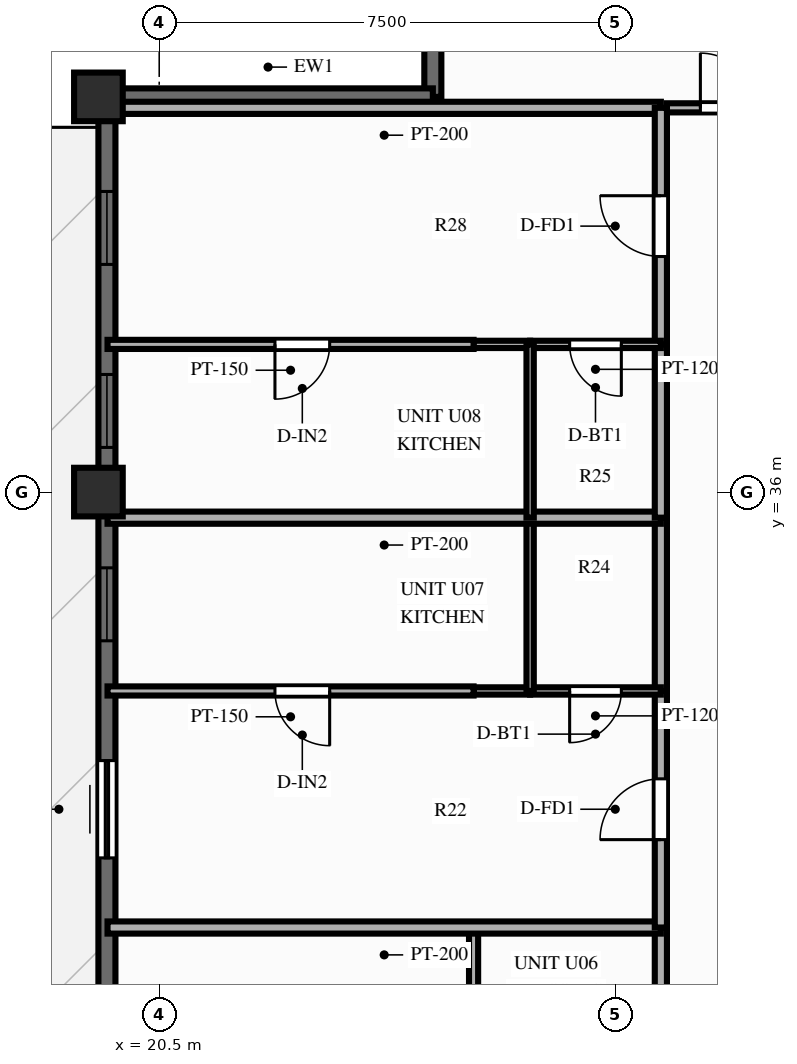
"""IFC4 building model, lengths in metres.
Left out: names, types, materials, properties, quantities, classifications, styles, units other than length and angle.
Written with IfcOpenShell. Run it as: python <this file> out.ifc"""

import sys

from ifc_helpers import new_model, si_unit, direction, frame, frame_2d, origin, origin_2d, place, context, subcontext, project, spatial, rectangle, extrude, source, transform, mapped, element, fill, save


model = new_model("IFC4")
c1 = context("Model", 3, precision=1e-05, world=origin(), true_north=direction((0.0, 1.0)))
c2 = subcontext(c1, "Body", "Model", "MODEL_VIEW")
j1 = project(units=[si_unit("LENGTHUNIT", "METRE"), si_unit("PLANEANGLEUNIT", "RADIAN")], contexts=[c1])
p1 = place(None, origin())
s1 = spatial("IfcSite", under=j1, at=p1, CompositionType="ELEMENT")
p2 = place(p1, origin())
s2 = spatial("IfcBuilding", under=s1, at=p2, CompositionType="ELEMENT")
p3 = place(p2, frame((0.0, 0.0, 199.6)))
s3 = spatial("IfcBuildingStorey", under=s2, at=p3, CompositionType="ELEMENT", Elevation=199.6)
m1 = source(origin(), c2, "Body", "SweptSolid", [
    extrude(rectangle(XDim=0.8, YDim=0.8, at=origin_2d()), origin(), (0.0, 0.0, 1.0), 3.0),
])
for number, where, z_axis, x_axis in (
    (1, (19.5, 42.5, 0.0), (0.0, 0.0, 1.0), (1.0, 0.0, 0.0)),
    (2, (19.5, 36.0, 0.0), (0.0, 0.0, 1.0), (1.0, 0.0, 0.0)),
):
    element("IfcColumn", number, at=place(p3, frame(where, z_axis=z_axis, x_axis=x_axis)), inside=s3, PredefinedType="COLUMN", context=c2, shape_type="MappedRepresentation", body=[
        mapped(m1, transform((0.0, 0.0, 0.0), scale=1.0)),
    ])
p4 = place(p3, frame((19.64, 11.5, 0.0), z_axis=(0.0, 0.0, 1.0), x_axis=(0.0, 1.0, 0.0)))
e3 = element("IfcWall", 3, at=p4, inside=s3, PredefinedType="SOLIDWALL", context=c2, shape_type="SweptSolid", body=[
    extrude(rectangle(XDim=31.0, YDim=0.28, at=frame_2d((15.5, 0.0))), origin(), (0.0, 0.0, 1.0), 2.28),
])
p5 = place(p4, frame((0.811, 0.0, 0.25)))
e4 = element("IfcOpeningElement", 4, at=p5, cuts=e3, PredefinedType="OPENING", context=c2, shape_type="SweptSolid", body=[
    extrude(rectangle(XDim=1.2, YDim=1.5, at=frame_2d((0.6, 0.75))), frame((0.0, 0.152, 0.0), z_axis=(0.0, -1.0, 0.0), x_axis=(1.0, 0.0, 0.0)), (0.0, 0.0, 1.0), 0.304),
])
p6 = place(p4, frame((3.281, 0.0, 0.25)))
e5 = element("IfcOpeningElement", 5, at=p6, cuts=e3, PredefinedType="OPENING", context=c2, shape_type="SweptSolid", body=[
    extrude(rectangle(XDim=1.2, YDim=1.5, at=frame_2d((0.6, 0.75))), frame((0.0, 0.152, 0.0), z_axis=(0.0, -1.0, 0.0), x_axis=(1.0, 0.0, 0.0)), (0.0, 0.0, 1.0), 0.304),
])
p7 = place(p4, frame((7.15, 0.0, 0.25)))
e6 = element("IfcOpeningElement", 6, at=p7, cuts=e3, PredefinedType="OPENING", context=c2, shape_type="SweptSolid", body=[
    extrude(rectangle(XDim=1.2, YDim=1.5, at=frame_2d((0.6, 0.75))), frame((0.0, 0.152, 0.0), z_axis=(0.0, -1.0, 0.0), x_axis=(1.0, 0.0, 0.0)), (0.0, 0.0, 1.0), 0.304),
])
p8 = place(p4, frame((9.36, 0.0, 0.25)))
e7 = element("IfcOpeningElement", 7, at=p8, cuts=e3, PredefinedType="OPENING", context=c2, shape_type="SweptSolid", body=[
    extrude(rectangle(XDim=1.2, YDim=1.5, at=frame_2d((0.6, 0.75))), frame((0.0, 0.152, 0.0), z_axis=(0.0, -1.0, 0.0), x_axis=(1.0, 0.0, 0.0)), (0.0, 0.0, 1.0), 0.304),
])
p9 = place(p4, frame((12.02, 0.0, 0.25)))
e8 = element("IfcOpeningElement", 8, at=p9, cuts=e3, PredefinedType="OPENING", context=c2, shape_type="SweptSolid", body=[
    extrude(rectangle(XDim=1.2, YDim=1.5, at=frame_2d((0.6, 0.75))), frame((0.0, 0.152, 0.0), z_axis=(0.0, -1.0, 0.0), x_axis=(1.0, 0.0, 0.0)), (0.0, 0.0, 1.0), 0.304),
])
p10 = place(p4, frame((15.108, 0.0, 0.25)))
e9 = element("IfcOpeningElement", 9, at=p10, cuts=e3, PredefinedType="OPENING", context=c2, shape_type="SweptSolid", body=[
    extrude(rectangle(XDim=1.2, YDim=1.5, at=frame_2d((0.6, 0.75))), frame((0.0, 0.152, 0.0), z_axis=(0.0, -1.0, 0.0), x_axis=(1.0, 0.0, 0.0)), (0.0, 0.0, 1.0), 0.304),
])
p11 = place(p4, frame((18.484, 0.0, 0.0)))
e10 = element("IfcOpeningElement", 10, at=p11, cuts=e3, PredefinedType="OPENING", context=c2, shape_type="SweptSolid", body=[
    extrude(rectangle(XDim=1.6, YDim=2.15, at=frame_2d((0.8, 1.075))), frame((0.0, 0.152, 0.0), z_axis=(0.0, -1.0, 0.0), x_axis=(1.0, 0.0, 0.0)), (0.0, 0.0, 1.0), 0.304),
])
p12 = place(p4, frame((22.054, 0.0, 0.25)))
e11 = element("IfcOpeningElement", 11, at=p12, cuts=e3, PredefinedType="OPENING", context=c2, shape_type="SweptSolid", body=[
    extrude(rectangle(XDim=1.2, YDim=1.5, at=frame_2d((0.6, 0.75))), frame((0.0, 0.152, 0.0), z_axis=(0.0, -1.0, 0.0), x_axis=(1.0, 0.0, 0.0)), (0.0, 0.0, 1.0), 0.304),
])
p13 = place(p4, frame((25.235, 0.0, 0.25)))
e12 = element("IfcOpeningElement", 12, at=p13, cuts=e3, PredefinedType="OPENING", context=c2, shape_type="SweptSolid", body=[
    extrude(rectangle(XDim=1.2, YDim=1.5, at=frame_2d((0.6, 0.75))), frame((0.0, 0.152, 0.0), z_axis=(0.0, -1.0, 0.0), x_axis=(1.0, 0.0, 0.0)), (0.0, 0.0, 1.0), 0.304),
])
p14 = place(p4, frame((28.245, 0.0, 0.25)))
e13 = element("IfcOpeningElement", 13, at=p14, cuts=e3, PredefinedType="OPENING", context=c2, shape_type="SweptSolid", body=[
    extrude(rectangle(XDim=1.2, YDim=1.5, at=frame_2d((0.6, 0.75))), frame((0.0, 0.152, 0.0), z_axis=(0.0, -1.0, 0.0), x_axis=(1.0, 0.0, 0.0)), (0.0, 0.0, 1.0), 0.304),
])
for number, where, z_axis, x_axis in (
    (14, (25.0, 42.5, 0.0), (0.0, 0.0, 1.0), (0.0, 1.0, 0.0)),
    (15, (19.58, 42.5, 0.0), (0.0, 0.0, 1.0), (1.0, 0.0, 0.0)),
):
    element("IfcWall", number, at=place(p3, frame(where, z_axis=z_axis, x_axis=x_axis)), inside=s3, PredefinedType="SOLIDWALL", context=c2, shape_type="SweptSolid", body=[
        extrude(rectangle(XDim=5.42, YDim=0.28, at=frame_2d((2.71, 0.0))), origin(), (0.0, 0.0, 1.0), 2.28),
    ])
p15 = place(p3, frame((28.85, 42.32, 0.0), z_axis=(0.0, 0.0, 1.0), x_axis=(1.0, 0.0, 0.0)))
e16 = element("IfcWall", 16, at=p15, inside=s3, PredefinedType="PARTITIONING", context=c2, shape_type="SweptSolid", body=[
    extrude(rectangle(XDim=2.33, YDim=0.15, at=frame_2d((1.165, 0.0))), origin(), (0.0, 0.0, 1.0), 2.79),
])
p16 = place(p15, frame((0.55, 0.0, 0.0)))
e17 = element("IfcOpeningElement", 17, at=p16, cuts=e16, PredefinedType="OPENING", context=c2, shape_type="SweptSolid", body=[
    extrude(rectangle(XDim=0.9, YDim=2.1, at=frame_2d((0.45, 1.05))), frame((0.0, 0.087, 0.0), z_axis=(0.0, -1.0, 0.0), x_axis=(1.0, 0.0, 0.0)), (0.0, 0.0, 1.0), 0.174),
])
p17 = place(p3, frame((28.75, 42.32, 0.0), z_axis=(0.0, 0.0, 1.0), x_axis=(-1.0, 0.0, 0.0)))
e18 = element("IfcWall", 18, at=p17, inside=s3, PredefinedType="PARTITIONING", context=c2, shape_type="SweptSolid", body=[
    extrude(rectangle(XDim=9.1, YDim=0.2, at=frame_2d((4.55, 0.0))), origin(), (0.0, 0.0, 1.0), 2.79),
])
p18 = place(p3, frame((28.75, 25.578, 0.0), z_axis=(0.0, 0.0, 1.0), x_axis=(0.0, 1.0, 0.0)))
e19 = element("IfcWall", 19, at=p18, inside=s3, PredefinedType="PARTITIONING", context=c2, shape_type="SweptSolid", body=[
    extrude(rectangle(XDim=3.26, YDim=0.2, at=frame_2d((1.63, 0.0))), origin(), (0.0, 0.0, 1.0), 2.79),
])
p19 = place(p3, frame((25.67, 25.578, 0.0), z_axis=(0.0, 0.0, 1.0), x_axis=(0.0, 1.0, 0.0)))
e20 = element("IfcWall", 20, at=p19, inside=s3, PredefinedType="PARTITIONING", context=c2, shape_type="SweptSolid", body=[
    extrude(rectangle(XDim=3.26, YDim=0.15, at=frame_2d((1.63, 0.0))), origin(), (0.0, 0.0, 1.0), 2.49),
])
p20 = place(p3, frame((28.75, 28.838, 0.0), z_axis=(0.0, 0.0, 1.0), x_axis=(-1.0, 0.0, 0.0)))
e21 = element("IfcWall", 21, at=p20, inside=s3, PredefinedType="PARTITIONING", context=c2, shape_type="SweptSolid", body=[
    extrude(rectangle(XDim=9.1, YDim=0.2, at=frame_2d((4.55, 0.0))), origin(), (0.0, 0.0, 1.0), 2.79),
])
p21 = place(p3, frame((28.75, 28.838, 0.0), z_axis=(0.0, 0.0, 1.0), x_axis=(0.0, 1.0, 0.0)))
e22 = element("IfcWall", 22, at=p21, inside=s3, PredefinedType="PARTITIONING", context=c2, shape_type="SweptSolid", body=[
    extrude(rectangle(XDim=3.891, YDim=0.2, at=frame_2d((1.945, 0.0))), origin(), (0.0, 0.0, 1.0), 2.79),
])
p22 = place(p21, frame((1.445, 0.0, 0.0)))
e23 = element("IfcOpeningElement", 23, at=p22, cuts=e22, PredefinedType="OPENING", context=c2, shape_type="SweptSolid", body=[
    extrude(rectangle(XDim=1.0, YDim=2.15, at=frame_2d((0.5, 1.075))), frame((0.0, 0.112, 0.0), z_axis=(0.0, -1.0, 0.0), x_axis=(1.0, 0.0, 0.0)), (0.0, 0.0, 1.0), 0.224),
])
p23 = place(p3, frame((28.75, 32.729, 0.0), z_axis=(0.0, 0.0, 1.0), x_axis=(0.0, 1.0, 0.0)))
e24 = element("IfcWall", 24, at=p23, inside=s3, PredefinedType="PARTITIONING", context=c2, shape_type="SweptSolid", body=[
    extrude(rectangle(XDim=2.85, YDim=0.2, at=frame_2d((1.425, 0.0))), origin(), (0.0, 0.0, 1.0), 2.79),
])
p24 = place(p3, frame((28.75, 32.729, 0.0), z_axis=(0.0, 0.0, 1.0), x_axis=(-1.0, 0.0, 0.0)))
e25 = element("IfcWall", 25, at=p24, inside=s3, PredefinedType="PARTITIONING", context=c2, shape_type="SweptSolid", body=[
    extrude(rectangle(XDim=2.15, YDim=0.12, at=frame_2d((1.075, 0.0))), origin(), (0.0, 0.0, 1.0), 2.79),
])
p25 = place(p24, frame((0.65, 0.0, 0.0)))
e26 = element("IfcOpeningElement", 26, at=p25, cuts=e25, PredefinedType="OPENING", context=c2, shape_type="SweptSolid", body=[
    extrude(rectangle(XDim=0.85, YDim=2.05, at=frame_2d((0.425, 1.025))), frame((0.0, 0.072, 0.0), z_axis=(0.0, -1.0, 0.0), x_axis=(1.0, 0.0, 0.0)), (0.0, 0.0, 1.0), 0.144),
])
p26 = place(p3, frame((26.6, 32.729, 0.0), z_axis=(0.0, 0.0, 1.0), x_axis=(-1.0, 0.0, 0.0)))
e27 = element("IfcWall", 27, at=p26, inside=s3, PredefinedType="PARTITIONING", context=c2, shape_type="SweptSolid", body=[
    extrude(rectangle(XDim=0.93, YDim=0.12, at=frame_2d((0.465, 0.0))), origin(), (0.0, 0.0, 1.0), 2.79),
])
p27 = place(p3, frame((26.6, 32.729, 0.0), z_axis=(0.0, 0.0, 1.0), x_axis=(0.0, 1.0, 0.0)))
e28 = element("IfcWall", 28, at=p27, inside=s3, PredefinedType="PARTITIONING", context=c2, shape_type="SweptSolid", body=[
    extrude(rectangle(XDim=2.85, YDim=0.12, at=frame_2d((1.425, 0.0))), origin(), (0.0, 0.0, 1.0), 2.79),
])
p28 = place(p3, frame((25.67, 32.729, 0.0), z_axis=(0.0, 0.0, 1.0), x_axis=(-1.0, 0.0, 0.0)))
e29 = element("IfcWall", 29, at=p28, inside=s3, PredefinedType="PARTITIONING", context=c2, shape_type="SweptSolid", body=[
    extrude(rectangle(XDim=6.02, YDim=0.15, at=frame_2d((3.01, 0.0))), origin(), (0.0, 0.0, 1.0), 2.79),
])
p29 = place(p28, frame((2.367, 0.0, 0.0)))
e30 = element("IfcOpeningElement", 30, at=p29, cuts=e29, PredefinedType="OPENING", context=c2, shape_type="SweptSolid", body=[
    extrude(rectangle(XDim=0.9, YDim=2.1, at=frame_2d((0.45, 1.05))), frame((0.0, 0.087, 0.0), z_axis=(0.0, -1.0, 0.0), x_axis=(1.0, 0.0, 0.0)), (0.0, 0.0, 1.0), 0.174),
])
p30 = place(p3, frame((28.75, 35.579, 0.0), z_axis=(0.0, 0.0, 1.0), x_axis=(-1.0, 0.0, 0.0)))
e31 = element("IfcWall", 31, at=p30, inside=s3, PredefinedType="PARTITIONING", context=c2, shape_type="SweptSolid", body=[
    extrude(rectangle(XDim=9.1, YDim=0.2, at=frame_2d((4.55, 0.0))), origin(), (0.0, 0.0, 1.0), 2.79),
])
p31 = place(p3, frame((28.75, 35.579, 0.0), z_axis=(0.0, 0.0, 1.0), x_axis=(0.0, 1.0, 0.0)))
e32 = element("IfcWall", 32, at=p31, inside=s3, PredefinedType="PARTITIONING", context=c2, shape_type="SweptSolid", body=[
    extrude(rectangle(XDim=2.85, YDim=0.2, at=frame_2d((1.425, 0.0))), origin(), (0.0, 0.0, 1.0), 2.79),
])
p32 = place(p3, frame((28.75, 38.429, 0.0), z_axis=(0.0, 0.0, 1.0), x_axis=(0.0, 1.0, 0.0)))
e33 = element("IfcWall", 33, at=p32, inside=s3, PredefinedType="PARTITIONING", context=c2, shape_type="SweptSolid", body=[
    extrude(rectangle(XDim=3.891, YDim=0.2, at=frame_2d((1.945, 0.0))), origin(), (0.0, 0.0, 1.0), 2.79),
])
p33 = place(p32, frame((1.445, 0.0, 0.0)))
e34 = element("IfcOpeningElement", 34, at=p33, cuts=e33, PredefinedType="OPENING", context=c2, shape_type="SweptSolid", body=[
    extrude(rectangle(XDim=1.0, YDim=2.15, at=frame_2d((0.5, 1.075))), frame((0.0, 0.112, 0.0), z_axis=(0.0, -1.0, 0.0), x_axis=(1.0, 0.0, 0.0)), (0.0, 0.0, 1.0), 0.224),
])
p34 = place(p3, frame((28.75, 38.429, 0.0), z_axis=(0.0, 0.0, 1.0), x_axis=(-1.0, 0.0, 0.0)))
e35 = element("IfcWall", 35, at=p34, inside=s3, PredefinedType="PARTITIONING", context=c2, shape_type="SweptSolid", body=[
    extrude(rectangle(XDim=2.15, YDim=0.12, at=frame_2d((1.075, 0.0))), origin(), (0.0, 0.0, 1.0), 2.79),
])
p35 = place(p34, frame((0.65, 0.0, 0.0)))
e36 = element("IfcOpeningElement", 36, at=p35, cuts=e35, PredefinedType="OPENING", context=c2, shape_type="SweptSolid", body=[
    extrude(rectangle(XDim=0.85, YDim=2.05, at=frame_2d((0.425, 1.025))), frame((0.0, 0.072, 0.0), z_axis=(0.0, -1.0, 0.0), x_axis=(1.0, 0.0, 0.0)), (0.0, 0.0, 1.0), 0.144),
])
p36 = place(p3, frame((26.6, 38.429, 0.0), z_axis=(0.0, 0.0, 1.0), x_axis=(-1.0, 0.0, 0.0)))
e37 = element("IfcWall", 37, at=p36, inside=s3, PredefinedType="PARTITIONING", context=c2, shape_type="SweptSolid", body=[
    extrude(rectangle(XDim=0.93, YDim=0.12, at=frame_2d((0.465, 0.0))), origin(), (0.0, 0.0, 1.0), 2.79),
])
p37 = place(p3, frame((26.6, 35.579, 0.0), z_axis=(0.0, 0.0, 1.0), x_axis=(0.0, 1.0, 0.0)))
e38 = element("IfcWall", 38, at=p37, inside=s3, PredefinedType="PARTITIONING", context=c2, shape_type="SweptSolid", body=[
    extrude(rectangle(XDim=2.85, YDim=0.12, at=frame_2d((1.425, 0.0))), origin(), (0.0, 0.0, 1.0), 2.79),
])
p38 = place(p3, frame((25.67, 38.429, 0.0), z_axis=(0.0, 0.0, 1.0), x_axis=(-1.0, 0.0, 0.0)))
e39 = element("IfcWall", 39, at=p38, inside=s3, PredefinedType="PARTITIONING", context=c2, shape_type="SweptSolid", body=[
    extrude(rectangle(XDim=6.02, YDim=0.15, at=frame_2d((3.01, 0.0))), origin(), (0.0, 0.0, 1.0), 2.79),
])
p39 = place(p38, frame((2.367, 0.0, 0.0)))
e40 = element("IfcOpeningElement", 40, at=p39, cuts=e39, PredefinedType="OPENING", context=c2, shape_type="SweptSolid", body=[
    extrude(rectangle(XDim=0.9, YDim=2.1, at=frame_2d((0.45, 1.05))), frame((0.0, 0.087, 0.0), z_axis=(0.0, -1.0, 0.0), x_axis=(1.0, 0.0, 0.0)), (0.0, 0.0, 1.0), 0.174),
])
m2 = source(origin(), c2, "Body", "SweptSolid", [
    extrude(rectangle(XDim=1.6, YDim=2.15, at=frame_2d((0.8, 1.075))), frame((0.0, 0.025, 0.0), z_axis=(0.0, -1.0, 0.0), x_axis=(1.0, 0.0, 0.0)), (0.0, 0.0, 1.0), 0.05),
])
p40 = place(p11, origin())
e41 = element("IfcDoor", 41, at=p40, inside=s3, OperationType="SLIDING_TO_LEFT", PredefinedType="DOOR", context=c2, shape_type="MappedRepresentation", body=[
    mapped(m2, transform((0.0, 0.0, 0.0), scale=1.0)),
])
fill(e10, e41)
m3 = source(origin(), c2, "Body", "SweptSolid", [
    extrude(rectangle(XDim=1.2, YDim=1.5, at=frame_2d((0.6, 0.75))), frame((0.0, 0.03, 0.0), z_axis=(0.0, -1.0, 0.0), x_axis=(1.0, 0.0, 0.0)), (0.0, 0.0, 1.0), 0.06),
])
p41 = place(p12, origin())
e42 = element("IfcWindow", 42, at=p41, inside=s3, PartitioningType="SINGLE_PANEL", PredefinedType="WINDOW", context=c2, shape_type="MappedRepresentation", body=[
    mapped(m3, transform((0.0, 0.0, 0.0), scale=1.0)),
])
fill(e11, e42)
p42 = place(p13, origin())
e43 = element("IfcWindow", 43, at=p42, inside=s3, PartitioningType="SINGLE_PANEL", PredefinedType="WINDOW", context=c2, shape_type="MappedRepresentation", body=[
    mapped(m3, transform((0.0, 0.0, 0.0), scale=1.0)),
])
fill(e12, e43)
p43 = place(p14, origin())
e44 = element("IfcWindow", 44, at=p43, inside=s3, PartitioningType="SINGLE_PANEL", PredefinedType="WINDOW", context=c2, shape_type="MappedRepresentation", body=[
    mapped(m3, transform((0.0, 0.0, 0.0), scale=1.0)),
])
fill(e13, e44)
m4 = source(origin(), c2, "Body", "SweptSolid", [
    extrude(rectangle(XDim=0.9, YDim=2.1, at=frame_2d((0.45, 1.05))), frame((0.0, 0.025, 0.0), z_axis=(0.0, -1.0, 0.0), x_axis=(1.0, 0.0, 0.0)), (0.0, 0.0, 1.0), 0.05),
])
p44 = place(p16, origin())
e45 = element("IfcDoor", 45, at=p44, inside=s3, OperationType="SINGLE_SWING_LEFT", PredefinedType="DOOR", context=c2, shape_type="MappedRepresentation", body=[
    mapped(m4, transform((0.0, 0.0, 0.0), scale=1.0)),
])
fill(e17, e45)
m5 = source(origin(), c2, "Body", "SweptSolid", [
    extrude(rectangle(XDim=1.0, YDim=2.15, at=frame_2d((0.5, 1.075))), frame((0.0, 0.025, 0.0), z_axis=(0.0, -1.0, 0.0), x_axis=(1.0, 0.0, 0.0)), (0.0, 0.0, 1.0), 0.05),
])
p45 = place(p22, origin())
e46 = element("IfcDoor", 46, at=p45, inside=s3, OperationType="SINGLE_SWING_LEFT", PredefinedType="DOOR", context=c2, shape_type="MappedRepresentation", body=[
    mapped(m5, transform((0.0, 0.0, 0.0), scale=1.0)),
])
fill(e23, e46)
m6 = source(origin(), c2, "Body", "SweptSolid", [
    extrude(rectangle(XDim=0.85, YDim=2.05, at=frame_2d((0.425, 1.025))), frame((0.0, 0.025, 0.0), z_axis=(0.0, -1.0, 0.0), x_axis=(1.0, 0.0, 0.0)), (0.0, 0.0, 1.0), 0.05),
])
p46 = place(p25, origin())
e47 = element("IfcDoor", 47, at=p46, inside=s3, OperationType="SINGLE_SWING_RIGHT", PredefinedType="DOOR", context=c2, shape_type="MappedRepresentation", body=[
    mapped(m6, transform((0.0, 0.0, 0.0), scale=1.0)),
])
fill(e26, e47)
p47 = place(p29, origin())
e48 = element("IfcDoor", 48, at=p47, inside=s3, OperationType="SINGLE_SWING_LEFT", PredefinedType="DOOR", context=c2, shape_type="MappedRepresentation", body=[
    mapped(m4, transform((0.0, 0.0, 0.0), scale=1.0)),
])
fill(e30, e48)
p48 = place(p33, origin())
e49 = element("IfcDoor", 49, at=p48, inside=s3, OperationType="SINGLE_SWING_RIGHT", PredefinedType="DOOR", context=c2, shape_type="MappedRepresentation", body=[
    mapped(m5, transform((0.0, 0.0, 0.0), scale=1.0)),
])
fill(e34, e49)
p49 = place(p35, origin())
e50 = element("IfcDoor", 50, at=p49, inside=s3, OperationType="SINGLE_SWING_LEFT", PredefinedType="DOOR", context=c2, shape_type="MappedRepresentation", body=[
    mapped(m6, transform((0.0, 0.0, 0.0), scale=1.0)),
])
fill(e36, e50)
p50 = place(p39, origin())
e51 = element("IfcDoor", 51, at=p50, inside=s3, OperationType="SINGLE_SWING_RIGHT", PredefinedType="DOOR", context=c2, shape_type="MappedRepresentation", body=[
    mapped(m4, transform((0.0, 0.0, 0.0), scale=1.0)),
])
fill(e40, e51)
save(model, sys.argv[1])
